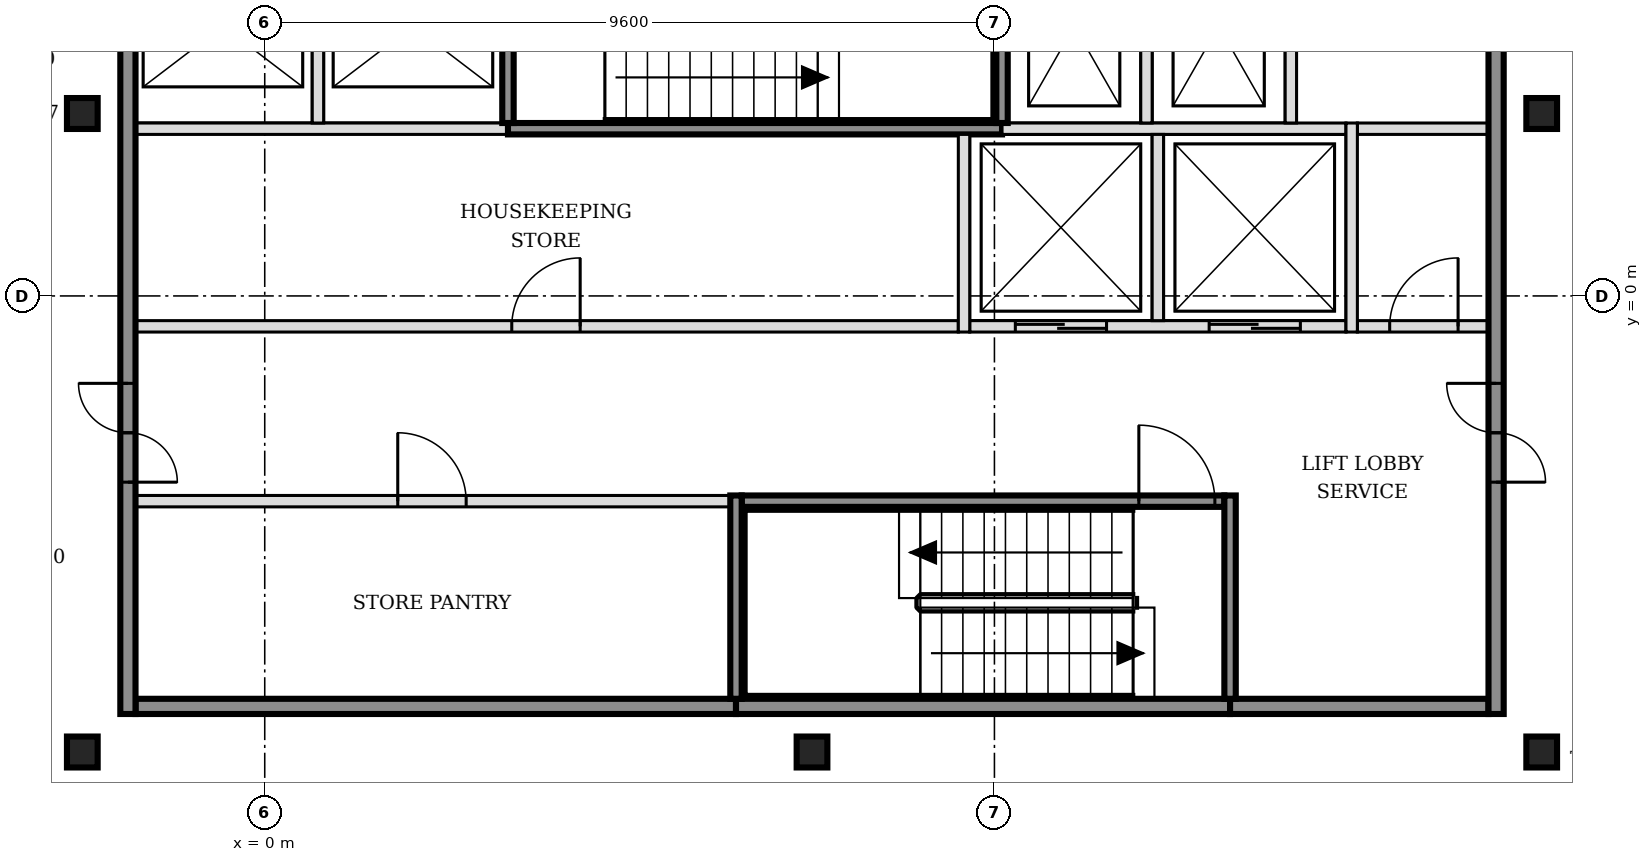
"""IFC4 building model, lengths in metres.
Left out: names, types, materials, properties, quantities, classifications, styles, units other than length and angle.
Written with IfcOpenShell. Run it as: python <this file> out.ifc"""

import sys

from ifc_helpers import new_model, si_unit, direction, frame, frame_2d, origin, origin_2d, place, context, subcontext, project, spatial, rectangle, i_section, extrude, element, fill, save


model = new_model("IFC4")
c1 = context("Model", 3, precision=1e-05, world=origin(), true_north=direction((0.0, 1.0)))
c2 = subcontext(c1, "Body", "Model", "MODEL_VIEW")
j1 = project(units=[si_unit("LENGTHUNIT", "METRE"), si_unit("PLANEANGLEUNIT", "RADIAN")], contexts=[c1])
p1 = place(None, origin())
s1 = spatial("IfcSite", under=j1, at=p1, CompositionType="ELEMENT")
p2 = place(p1, origin())
s2 = spatial("IfcBuilding", under=s1, at=p2, CompositionType="ELEMENT")
p3 = place(p2, frame((0.0, 0.0, 221.4)))
s3 = spatial("IfcBuildingStorey", under=s2, at=p3, CompositionType="ELEMENT", Elevation=221.4)
for number, where, z_axis, x_axis in (
    (1, (-2.4, -6.0, -0.15), (0.0, 0.0, 1.0), (1.0, 0.0, 0.0)),
    (2, (7.2, -6.0, -0.15), (0.0, 0.0, 1.0), (1.0, 0.0, 0.0)),
    (3, (16.8, -6.0, -0.15), (0.0, 0.0, 1.0), (1.0, 0.0, 0.0)),
    (4, (-2.4, 2.4, -0.15), (0.0, 0.0, 1.0), (1.0, 0.0, 0.0)),
    (5, (16.8, 2.4, -0.15), (0.0, 0.0, 1.0), (1.0, 0.0, 0.0)),
):
    element("IfcColumn", number, at=place(p3, frame(where, z_axis=z_axis, x_axis=x_axis)), inside=s3, PredefinedType="COLUMN", context=c2, shape_type="SweptSolid", body=[
        extrude(i_section(OverallWidth=0.404, OverallDepth=0.407, WebThickness=0.027, FlangeThickness=0.044, FilletRadius=0.015, at=origin_2d()), origin(), (0.0, 0.0, 1.0), 3.6),
    ])
p4 = place(p3, frame((-1.7, -5.4, 0.0), z_axis=(0.0, 0.0, 1.0), x_axis=(1.0, 0.0, 0.0)))
e6 = element("IfcWall", 6, at=p4, inside=s3, PredefinedType="SOLIDWALL", context=c2, shape_type="SweptSolid", body=[
    extrude(rectangle(XDim=7.9, YDim=0.2, at=frame_2d((3.95, 0.0))), origin(), (0.0, 0.0, 1.0), 3.45),
])
p5 = place(p3, frame((6.2, -5.4, 0.0), z_axis=(0.0, 0.0, 1.0), x_axis=(1.0, 0.0, 0.0)))
e7 = element("IfcWall", 7, at=p5, inside=s3, PredefinedType="SOLIDWALL", context=c2, shape_type="SweptSolid", body=[
    extrude(rectangle(XDim=6.5, YDim=0.2, at=frame_2d((3.25, 0.0))), origin(), (0.0, 0.0, 1.0), 3.45),
])
p6 = place(p3, frame((12.7, -5.4, 0.0), z_axis=(0.0, 0.0, 1.0), x_axis=(1.0, 0.0, 0.0)))
e8 = element("IfcWall", 8, at=p6, inside=s3, PredefinedType="SOLIDWALL", context=c2, shape_type="SweptSolid", body=[
    extrude(rectangle(XDim=3.4, YDim=0.2, at=frame_2d((1.7, 0.0))), origin(), (0.0, 0.0, 1.0), 3.45),
])
p7 = place(p3, frame((-1.7, -2.7, 0.0), z_axis=(0.0, 0.0, 1.0), x_axis=(1.0, 0.0, 0.0)))
e9 = element("IfcWall", 9, at=p7, inside=s3, PredefinedType="PARTITIONING", context=c2, shape_type="SweptSolid", body=[
    extrude(rectangle(XDim=7.825, YDim=0.15, at=frame_2d((3.913, 0.0))), origin(), (0.0, 0.0, 1.0), 3.45),
])
p8 = place(p7, frame((3.45, 0.0, 0.0)))
e10 = element("IfcOpeningElement", 10, at=p8, cuts=e9, PredefinedType="OPENING", context=c2, shape_type="SweptSolid", body=[
    extrude(rectangle(XDim=0.9, YDim=2.1, at=frame_2d((0.45, 1.05))), frame((0.0, 0.085, 0.0), z_axis=(0.0, -1.0, 0.0), x_axis=(1.0, 0.0, 0.0)), (0.0, 0.0, 1.0), 0.17),
])
p9 = place(p3, frame((6.275, -2.7, 0.0), z_axis=(0.0, 0.0, 1.0), x_axis=(1.0, 0.0, 0.0)))
e11 = element("IfcWall", 11, at=p9, inside=s3, PredefinedType="SOLIDWALL", context=c2, shape_type="SweptSolid", body=[
    extrude(rectangle(XDim=6.35, YDim=0.15, at=frame_2d((3.175, 0.0))), origin(), (0.0, 0.0, 1.0), 3.45),
])
p10 = place(p9, frame((5.225, 0.0, 0.0)))
e12 = element("IfcOpeningElement", 12, at=p10, cuts=e11, PredefinedType="OPENING", context=c2, shape_type="SweptSolid", body=[
    extrude(rectangle(XDim=1.0, YDim=2.1, at=frame_2d((0.5, 1.05))), frame((0.0, 0.085, 0.0), z_axis=(0.0, -1.0, 0.0), x_axis=(1.0, 0.0, 0.0)), (0.0, 0.0, 1.0), 0.17),
])
p11 = place(p3, frame((-1.7, -0.4, 0.0), z_axis=(0.0, 0.0, 1.0), x_axis=(1.0, 0.0, 0.0)))
e13 = element("IfcWall", 13, at=p11, inside=s3, PredefinedType="PARTITIONING", context=c2, shape_type="SweptSolid", body=[
    extrude(rectangle(XDim=10.825, YDim=0.15, at=frame_2d((5.413, 0.0))), origin(), (0.0, 0.0, 1.0), 3.45),
])
p12 = place(p11, frame((4.95, 0.0, 0.0)))
e14 = element("IfcOpeningElement", 14, at=p12, cuts=e13, PredefinedType="OPENING", context=c2, shape_type="SweptSolid", body=[
    extrude(rectangle(XDim=0.9, YDim=2.1, at=frame_2d((0.45, 1.05))), frame((0.0, 0.085, 0.0), z_axis=(0.0, -1.0, 0.0), x_axis=(1.0, 0.0, 0.0)), (0.0, 0.0, 1.0), 0.17),
])
p13 = place(p3, frame((9.275, -0.4, 0.0), z_axis=(0.0, 0.0, 1.0), x_axis=(1.0, 0.0, 0.0)))
e15 = element("IfcWall", 15, at=p13, inside=s3, PredefinedType="SOLIDWALL", context=c2, shape_type="SweptSolid", body=[
    extrude(rectangle(XDim=4.95, YDim=0.15, at=frame_2d((2.475, 0.0))), origin(), (0.0, 0.0, 1.0), 3.45),
])
p14 = place(p13, frame((0.6, 0.0, 0.0)))
e16 = element("IfcOpeningElement", 16, at=p14, cuts=e15, PredefinedType="OPENING", context=c2, shape_type="SweptSolid", body=[
    extrude(rectangle(XDim=1.2, YDim=2.1, at=frame_2d((0.6, 1.05))), frame((0.0, 0.085, 0.0), z_axis=(0.0, -1.0, 0.0), x_axis=(1.0, 0.0, 0.0)), (0.0, 0.0, 1.0), 0.17),
])
p15 = place(p13, frame((3.15, 0.0, 0.0)))
e17 = element("IfcOpeningElement", 17, at=p15, cuts=e15, PredefinedType="OPENING", context=c2, shape_type="SweptSolid", body=[
    extrude(rectangle(XDim=1.2, YDim=2.1, at=frame_2d((0.6, 1.05))), frame((0.0, 0.085, 0.0), z_axis=(0.0, -1.0, 0.0), x_axis=(1.0, 0.0, 0.0)), (0.0, 0.0, 1.0), 0.17),
])
p16 = place(p3, frame((14.375, -0.4, 0.0), z_axis=(0.0, 0.0, 1.0), x_axis=(1.0, 0.0, 0.0)))
e18 = element("IfcWall", 18, at=p16, inside=s3, PredefinedType="PARTITIONING", context=c2, shape_type="SweptSolid", body=[
    extrude(rectangle(XDim=1.725, YDim=0.15, at=frame_2d((0.863, 0.0))), origin(), (0.0, 0.0, 1.0), 3.45),
])
p17 = place(p16, frame((0.425, 0.0, 0.0)))
e19 = element("IfcOpeningElement", 19, at=p17, cuts=e18, PredefinedType="OPENING", context=c2, shape_type="SweptSolid", body=[
    extrude(rectangle(XDim=0.9, YDim=2.1, at=frame_2d((0.45, 1.05))), frame((0.0, 0.085, 0.0), z_axis=(0.0, -1.0, 0.0), x_axis=(1.0, 0.0, 0.0)), (0.0, 0.0, 1.0), 0.17),
])
p18 = place(p3, frame((-1.7, 2.2, 0.0), z_axis=(0.0, 0.0, 1.0), x_axis=(1.0, 0.0, 0.0)))
e20 = element("IfcWall", 20, at=p18, inside=s3, PredefinedType="SOLIDWALL", context=c2, shape_type="SweptSolid", body=[
    extrude(rectangle(XDim=4.9, YDim=0.15, at=frame_2d((2.45, 0.0))), origin(), (0.0, 0.0, 1.0), 3.45),
])
p19 = place(p3, frame((3.2, 2.2, 0.0), z_axis=(0.0, 0.0, 1.0), x_axis=(1.0, 0.0, 0.0)))
e21 = element("IfcWall", 21, at=p19, inside=s3, PredefinedType="SOLIDWALL", context=c2, shape_type="SweptSolid", body=[
    extrude(rectangle(XDim=6.5, YDim=0.15, at=frame_2d((3.25, 0.0))), origin(), (0.0, 0.0, 1.0), 3.45),
])
p20 = place(p3, frame((9.7, 2.2, 0.0), z_axis=(0.0, 0.0, 1.0), x_axis=(1.0, 0.0, 0.0)))
e22 = element("IfcWall", 22, at=p20, inside=s3, PredefinedType="SOLIDWALL", context=c2, shape_type="SweptSolid", body=[
    extrude(rectangle(XDim=4.525, YDim=0.15, at=frame_2d((2.263, 0.0))), origin(), (0.0, 0.0, 1.0), 3.45),
])
p21 = place(p3, frame((14.375, 2.2, 0.0), z_axis=(0.0, 0.0, 1.0), x_axis=(1.0, 0.0, 0.0)))
e23 = element("IfcWall", 23, at=p21, inside=s3, PredefinedType="PARTITIONING", context=c2, shape_type="SweptSolid", body=[
    extrude(rectangle(XDim=1.725, YDim=0.15, at=frame_2d((0.863, 0.0))), origin(), (0.0, 0.0, 1.0), 3.45),
])
p22 = place(p3, frame((-1.8, -5.5, 0.0), z_axis=(0.0, 0.0, 1.0), x_axis=(0.0, 1.0, 0.0)))
e24 = element("IfcWall", 24, at=p22, inside=s3, PredefinedType="SOLIDWALL", context=c2, shape_type="SweptSolid", body=[
    extrude(rectangle(XDim=15.8, YDim=0.2, at=frame_2d((7.9, 0.0))), origin(), (0.0, 0.0, 1.0), 3.45),
])
p23 = place(p22, frame((3.05, 0.0, 0.0)))
e25 = element("IfcOpeningElement", 25, at=p23, cuts=e24, PredefinedType="OPENING", context=c2, shape_type="SweptSolid", body=[
    extrude(rectangle(XDim=1.3, YDim=2.1, at=frame_2d((0.65, 1.05))), frame((0.0, 0.11, 0.0), z_axis=(0.0, -1.0, 0.0), x_axis=(1.0, 0.0, 0.0)), (0.0, 0.0, 1.0), 0.22),
])
p24 = place(p22, frame((11.45, 0.0, 0.0)))
e26 = element("IfcOpeningElement", 26, at=p24, cuts=e24, PredefinedType="OPENING", context=c2, shape_type="SweptSolid", body=[
    extrude(rectangle(XDim=1.3, YDim=2.1, at=frame_2d((0.65, 1.05))), frame((0.0, 0.11, 0.0), z_axis=(0.0, -1.0, 0.0), x_axis=(1.0, 0.0, 0.0)), (0.0, 0.0, 1.0), 0.22),
])
for number, where, z_axis, x_axis in (
    (27, (0.7, 2.275, 0.0), (0.0, 0.0, 1.0), (0.0, 1.0, 0.0)),
    (28, (3.2, 2.275, 0.0), (0.0, 0.0, 1.0), (0.0, 1.0, 0.0)),
):
    element("IfcWall", number, at=place(p3, frame(where, z_axis=z_axis, x_axis=x_axis)), inside=s3, PredefinedType="SOLIDWALL", context=c2, shape_type="SweptSolid", body=[
        extrude(rectangle(XDim=2.55, YDim=0.15, at=frame_2d((1.275, 0.0))), origin(), (0.0, 0.0, 1.0), 3.45),
    ])
p25 = place(p3, frame((6.2, -5.3, 0.0), z_axis=(0.0, 0.0, 1.0), x_axis=(0.0, 1.0, 0.0)))
e29 = element("IfcWall", 29, at=p25, inside=s3, PredefinedType="SOLIDWALL", context=c2, shape_type="SweptSolid", body=[
    extrude(rectangle(XDim=2.675, YDim=0.15, at=frame_2d((1.337, 0.0))), origin(), (0.0, 0.0, 1.0), 3.45),
])
p26 = place(p3, frame((9.2, -0.475, 0.0), z_axis=(0.0, 0.0, 1.0), x_axis=(0.0, 1.0, 0.0)))
e30 = element("IfcWall", 30, at=p26, inside=s3, PredefinedType="SOLIDWALL", context=c2, shape_type="SweptSolid", body=[
    extrude(rectangle(XDim=2.6, YDim=0.15, at=frame_2d((1.3, 0.0))), origin(), (0.0, 0.0, 1.0), 3.45),
])
for number, where, z_axis, x_axis in (
    (31, (9.7, 2.275, 0.0), (0.0, 0.0, 1.0), (0.0, 1.0, 0.0)),
    (32, (11.6, 2.275, 0.0), (0.0, 0.0, 1.0), (0.0, 1.0, 0.0)),
):
    element("IfcWall", number, at=place(p3, frame(where, z_axis=z_axis, x_axis=x_axis)), inside=s3, PredefinedType="SOLIDWALL", context=c2, shape_type="SweptSolid", body=[
        extrude(rectangle(XDim=2.55, YDim=0.15, at=frame_2d((1.275, 0.0))), origin(), (0.0, 0.0, 1.0), 3.45),
    ])
p27 = place(p3, frame((11.75, -0.325, 0.0), z_axis=(0.0, 0.0, 1.0), x_axis=(0.0, 1.0, 0.0)))
e33 = element("IfcWall", 33, at=p27, inside=s3, PredefinedType="SOLIDWALL", context=c2, shape_type="SweptSolid", body=[
    extrude(rectangle(XDim=2.45, YDim=0.15, at=frame_2d((1.225, 0.0))), origin(), (0.0, 0.0, 1.0), 3.45),
])
p28 = place(p3, frame((12.7, -5.3, 0.0), z_axis=(0.0, 0.0, 1.0), x_axis=(0.0, 1.0, 0.0)))
e34 = element("IfcWall", 34, at=p28, inside=s3, PredefinedType="SOLIDWALL", context=c2, shape_type="SweptSolid", body=[
    extrude(rectangle(XDim=2.675, YDim=0.15, at=frame_2d((1.337, 0.0))), origin(), (0.0, 0.0, 1.0), 3.45),
])
p29 = place(p3, frame((13.5, 2.275, 0.0), z_axis=(0.0, 0.0, 1.0), x_axis=(0.0, 1.0, 0.0)))
e35 = element("IfcWall", 35, at=p29, inside=s3, PredefinedType="SOLIDWALL", context=c2, shape_type="SweptSolid", body=[
    extrude(rectangle(XDim=2.55, YDim=0.15, at=frame_2d((1.275, 0.0))), origin(), (0.0, 0.0, 1.0), 3.45),
])
p30 = place(p3, frame((14.3, -0.475, 0.0), z_axis=(0.0, 0.0, 1.0), x_axis=(0.0, 1.0, 0.0)))
e36 = element("IfcWall", 36, at=p30, inside=s3, PredefinedType="SOLIDWALL", context=c2, shape_type="SweptSolid", body=[
    extrude(rectangle(XDim=2.75, YDim=0.15, at=frame_2d((1.375, 0.0))), origin(), (0.0, 0.0, 1.0), 3.45),
])
p31 = place(p3, frame((16.2, -5.5, 0.0), z_axis=(0.0, 0.0, 1.0), x_axis=(0.0, 1.0, 0.0)))
e37 = element("IfcWall", 37, at=p31, inside=s3, PredefinedType="SOLIDWALL", context=c2, shape_type="SweptSolid", body=[
    extrude(rectangle(XDim=15.8, YDim=0.2, at=frame_2d((7.9, 0.0))), origin(), (0.0, 0.0, 1.0), 3.45),
])
p32 = place(p31, frame((3.05, 0.0, 0.0)))
e38 = element("IfcOpeningElement", 38, at=p32, cuts=e37, PredefinedType="OPENING", context=c2, shape_type="SweptSolid", body=[
    extrude(rectangle(XDim=1.3, YDim=2.1, at=frame_2d((0.65, 1.05))), frame((0.0, 0.11, 0.0), z_axis=(0.0, -1.0, 0.0), x_axis=(1.0, 0.0, 0.0)), (0.0, 0.0, 1.0), 0.22),
])
p33 = place(p31, frame((11.45, 0.0, 0.0)))
e39 = element("IfcOpeningElement", 39, at=p33, cuts=e37, PredefinedType="OPENING", context=c2, shape_type="SweptSolid", body=[
    extrude(rectangle(XDim=1.3, YDim=2.1, at=frame_2d((0.65, 1.05))), frame((0.0, 0.11, 0.0), z_axis=(0.0, -1.0, 0.0), x_axis=(1.0, 0.0, 0.0)), (0.0, 0.0, 1.0), 0.22),
])
p34 = place(p3, frame((16.722, -14.272, 0.0), z_axis=(0.0, 0.0, 1.0), x_axis=(0.707106781187, 0.707106781187, 0.0)))
e40 = element("IfcWall", 40, at=p34, inside=s3, PredefinedType="PARTITIONING", context=c2, shape_type="SweptSolid", body=[
    extrude(rectangle(XDim=20.049, YDim=0.15, at=frame_2d((10.025, 0.0))), origin(), (0.0, 0.0, 1.0), 2.73),
])
p35 = place(p34, frame((4.892, 0.0, 0.0)))
e41 = element("IfcOpeningElement", 41, at=p35, cuts=e40, PredefinedType="OPENING", context=c2, shape_type="SweptSolid", body=[
    extrude(rectangle(XDim=0.9, YDim=2.1, at=frame_2d((0.45, 1.05))), frame((0.0, 0.085, 0.0), z_axis=(0.0, -1.0, 0.0), x_axis=(1.0, 0.0, 0.0)), (0.0, 0.0, 1.0), 0.17),
])
p36 = place(p34, frame((10.042, 0.0, 0.0)))
e42 = element("IfcOpeningElement", 42, at=p36, cuts=e40, PredefinedType="OPENING", context=c2, shape_type="SweptSolid", body=[
    extrude(rectangle(XDim=0.9, YDim=2.1, at=frame_2d((0.45, 1.05))), frame((0.0, 0.085, 0.0), z_axis=(0.0, -1.0, 0.0), x_axis=(1.0, 0.0, 0.0)), (0.0, 0.0, 1.0), 0.17),
])
p37 = place(p34, frame((14.443, 0.0, 0.0)))
e43 = element("IfcOpeningElement", 43, at=p37, cuts=e40, PredefinedType="OPENING", context=c2, shape_type="SweptSolid", body=[
    extrude(rectangle(XDim=0.9, YDim=2.1, at=frame_2d((0.45, 1.05))), frame((0.0, 0.085, 0.0), z_axis=(0.0, -1.0, 0.0), x_axis=(1.0, 0.0, 0.0)), (0.0, 0.0, 1.0), 0.17),
])
p38 = place(p34, frame((17.837, 0.0, 0.0)))
e44 = element("IfcOpeningElement", 44, at=p38, cuts=e40, PredefinedType="OPENING", context=c2, shape_type="SweptSolid", body=[
    extrude(rectangle(XDim=0.9, YDim=2.1, at=frame_2d((0.45, 1.05))), frame((0.0, 0.085, 0.0), z_axis=(0.0, -1.0, 0.0), x_axis=(1.0, 0.0, 0.0)), (0.0, 0.0, 1.0), 0.17),
])
p39 = place(p14, origin())
e45 = element("IfcDoor", 45, at=p39, inside=s3, OperationType="DOUBLE_DOOR_SLIDING", PredefinedType="DOOR", context=c2, shape_type="SweptSolid", body=[
    extrude(rectangle(XDim=1.2, YDim=2.1, at=frame_2d((0.6, 1.05))), frame((0.0, 0.025, 0.0), z_axis=(0.0, -1.0, 0.0), x_axis=(1.0, 0.0, 0.0)), (0.0, 0.0, 1.0), 0.05),
])
fill(e16, e45)
p40 = place(p15, origin())
e46 = element("IfcDoor", 46, at=p40, inside=s3, OperationType="DOUBLE_DOOR_SLIDING", PredefinedType="DOOR", context=c2, shape_type="SweptSolid", body=[
    extrude(rectangle(XDim=1.2, YDim=2.1, at=frame_2d((0.6, 1.05))), frame((0.0, 0.025, 0.0), z_axis=(0.0, -1.0, 0.0), x_axis=(1.0, 0.0, 0.0)), (0.0, 0.0, 1.0), 0.05),
])
fill(e17, e46)
p41 = place(p10, origin())
e47 = element("IfcDoor", 47, at=p41, inside=s3, OperationType="SINGLE_SWING_LEFT", PredefinedType="DOOR", context=c2, shape_type="SweptSolid", body=[
    extrude(rectangle(XDim=1.0, YDim=2.1, at=frame_2d((0.5, 1.05))), frame((0.0, 0.025, 0.0), z_axis=(0.0, -1.0, 0.0), x_axis=(1.0, 0.0, 0.0)), (0.0, 0.0, 1.0), 0.05),
])
fill(e12, e47)
p42 = place(p23, origin())
e48 = element("IfcDoor", 48, at=p42, inside=s3, OperationType="DOUBLE_DOOR_SINGLE_SWING", PredefinedType="DOOR", context=c2, shape_type="SweptSolid", body=[
    extrude(rectangle(XDim=1.3, YDim=2.1, at=frame_2d((0.65, 1.05))), frame((0.0, 0.025, 0.0), z_axis=(0.0, -1.0, 0.0), x_axis=(1.0, 0.0, 0.0)), (0.0, 0.0, 1.0), 0.05),
])
fill(e25, e48)
p43 = place(p32, origin())
e49 = element("IfcDoor", 49, at=p43, inside=s3, OperationType="DOUBLE_DOOR_SINGLE_SWING", PredefinedType="DOOR", context=c2, shape_type="SweptSolid", body=[
    extrude(rectangle(XDim=1.3, YDim=2.1, at=frame_2d((0.65, 1.05))), frame((0.0, 0.025, 0.0), z_axis=(0.0, -1.0, 0.0), x_axis=(1.0, 0.0, 0.0)), (0.0, 0.0, 1.0), 0.05),
])
fill(e38, e49)
p44 = place(p17, origin())
e50 = element("IfcDoor", 50, at=p44, inside=s3, OperationType="SINGLE_SWING_RIGHT", PredefinedType="DOOR", context=c2, shape_type="SweptSolid", body=[
    extrude(rectangle(XDim=0.9, YDim=2.1, at=frame_2d((0.45, 1.05))), frame((0.0, 0.025, 0.0), z_axis=(0.0, -1.0, 0.0), x_axis=(1.0, 0.0, 0.0)), (0.0, 0.0, 1.0), 0.05),
])
fill(e19, e50)
p45 = place(p8, origin())
e51 = element("IfcDoor", 51, at=p45, inside=s3, OperationType="SINGLE_SWING_LEFT", PredefinedType="DOOR", context=c2, shape_type="SweptSolid", body=[
    extrude(rectangle(XDim=0.9, YDim=2.1, at=frame_2d((0.45, 1.05))), frame((0.0, 0.025, 0.0), z_axis=(0.0, -1.0, 0.0), x_axis=(1.0, 0.0, 0.0)), (0.0, 0.0, 1.0), 0.05),
])
fill(e10, e51)
p46 = place(p12, origin())
e52 = element("IfcDoor", 52, at=p46, inside=s3, OperationType="SINGLE_SWING_RIGHT", PredefinedType="DOOR", context=c2, shape_type="SweptSolid", body=[
    extrude(rectangle(XDim=0.9, YDim=2.1, at=frame_2d((0.45, 1.05))), frame((0.0, 0.025, 0.0), z_axis=(0.0, -1.0, 0.0), x_axis=(1.0, 0.0, 0.0)), (0.0, 0.0, 1.0), 0.05),
])
fill(e14, e52)
save(model, sys.argv[1])
